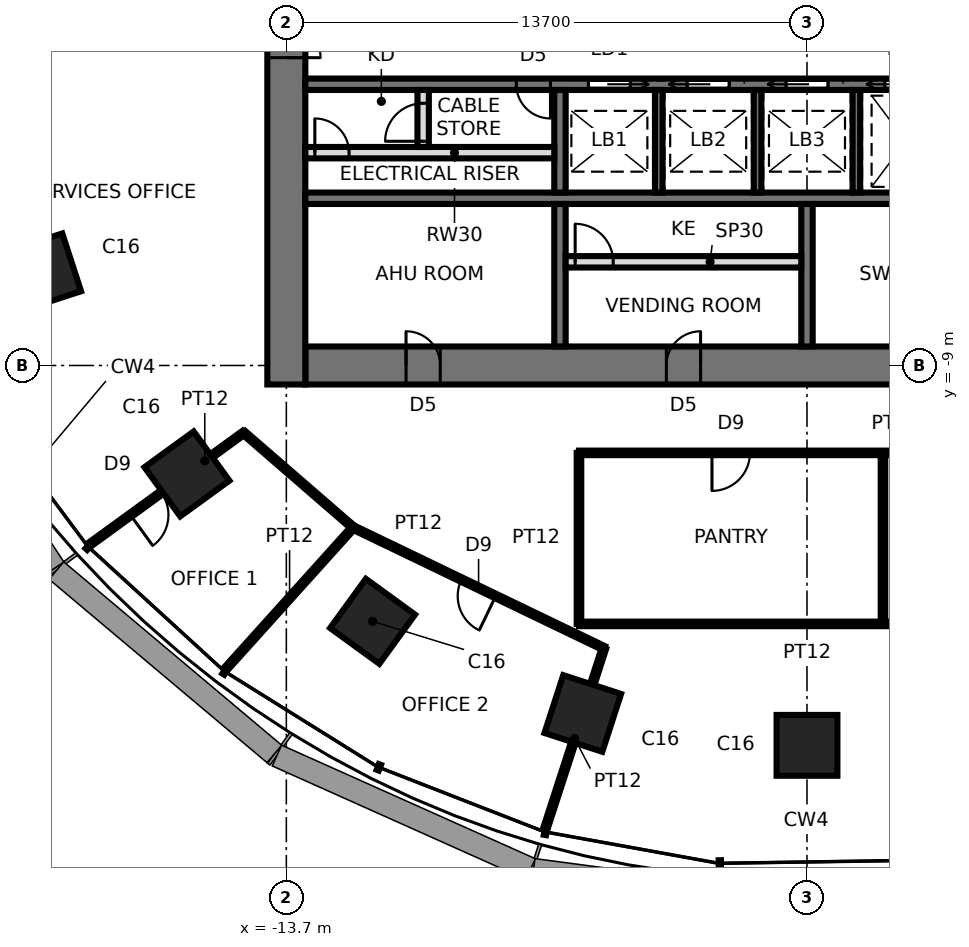
"""IFC4 building model, lengths in metres.
Left out: names, types, materials, properties, quantities, classifications, styles, units other than length and angle.
Written with IfcOpenShell. Run it as: python <this file> out.ifc"""

import sys

from ifc_helpers import new_model, si_unit, direction, frame, frame_2d, origin, origin_2d, place, context, subcontext, project, spatial, rectangle, extrude, element, fill, save


model = new_model("IFC4")
c1 = context("Model", 3, precision=1e-05, world=origin(), true_north=direction((0.0, 1.0)))
c2 = subcontext(c1, "Body", "Model", "MODEL_VIEW")
j1 = project(units=[si_unit("LENGTHUNIT", "METRE"), si_unit("PLANEANGLEUNIT", "RADIAN")], contexts=[c1])
p1 = place(None, origin())
s1 = spatial("IfcSite", under=j1, at=p1, CompositionType="ELEMENT")
p2 = place(p1, origin())
s2 = spatial("IfcBuilding", under=s1, at=p2, CompositionType="ELEMENT")
p3 = place(p2, frame((0.0, 0.0, 154.8)))
s3 = spatial("IfcBuildingStorey", under=s2, at=p3, CompositionType="ELEMENT", Elevation=154.8)
for number, where, z_axis, x_axis in (
    (1, (-20.109, -6.534, 0.0), (0.0, 0.0, 1.0), (-0.951, -0.309, 0.0)),
    (2, (-16.315, -11.854, 0.0), (0.0, 0.0, 1.0), (-0.809, -0.588, 0.0)),
    (3, (-11.43, -15.733, 0.0), (0.0, 0.0, 1.0), (-0.588, -0.809, 0.0)),
    (4, (-5.9, -18.157, 0.0), (0.0, 0.0, 1.0), (-0.309, -0.951, 0.0)),
    (5, (0.0, -18.996, 0.0), (0.0, 0.0, 1.0), (0.0, -1.0, 0.0)),
):
    element("IfcColumn", number, at=place(p3, frame(where, z_axis=z_axis, x_axis=x_axis)), inside=s3, PredefinedType="COLUMN", context=c2, shape_type="SweptSolid", body=[
        extrude(rectangle(XDim=1.6, YDim=1.6, at=origin_2d()), origin(), (0.0, 0.0, 1.0), 3.9),
    ])
p4 = place(p3, frame((-13.2, -9.0, 0.0), z_axis=(0.0, 0.0, 1.0), x_axis=(1.0, 0.0, 0.0)))
e6 = element("IfcWall", 6, at=p4, inside=s3, PredefinedType="SHEAR", context=c2, shape_type="SweptSolid", body=[
    extrude(rectangle(XDim=26.4, YDim=1.0, at=frame_2d((13.2, 0.0))), origin(), (0.0, 0.0, 1.0), 3.9),
])
p5 = place(p4, frame((2.65, 0.0, 0.0)))
e7 = element("IfcOpeningElement", 7, at=p5, cuts=e6, PredefinedType="OPENING", context=c2, shape_type="SweptSolid", body=[
    extrude(rectangle(XDim=0.9, YDim=2.1, at=frame_2d((0.45, 1.05))), frame((0.0, 0.51, 0.0), z_axis=(0.0, -1.0, 0.0), x_axis=(1.0, 0.0, 0.0)), (0.0, 0.0, 1.0), 1.02),
])
p6 = place(p4, frame((9.5, 0.0, 0.0)))
e8 = element("IfcOpeningElement", 8, at=p6, cuts=e6, PredefinedType="OPENING", context=c2, shape_type="SweptSolid", body=[
    extrude(rectangle(XDim=0.9, YDim=2.1, at=frame_2d((0.45, 1.05))), frame((0.0, 0.51, 0.0), z_axis=(0.0, -1.0, 0.0), x_axis=(1.0, 0.0, 0.0)), (0.0, 0.0, 1.0), 1.02),
])
p7 = place(p4, frame((16.0, 0.0, 0.0)))
e9 = element("IfcOpeningElement", 9, at=p7, cuts=e6, PredefinedType="OPENING", context=c2, shape_type="SweptSolid", body=[
    extrude(rectangle(XDim=0.9, YDim=2.1, at=frame_2d((0.45, 1.05))), frame((0.0, 0.51, 0.0), z_axis=(0.0, -1.0, 0.0), x_axis=(1.0, 0.0, 0.0)), (0.0, 0.0, 1.0), 1.02),
])
p8 = place(p4, frame((22.85, 0.0, 0.0)))
e10 = element("IfcOpeningElement", 10, at=p8, cuts=e6, PredefinedType="OPENING", context=c2, shape_type="SweptSolid", body=[
    extrude(rectangle(XDim=0.9, YDim=2.1, at=frame_2d((0.45, 1.05))), frame((0.0, 0.51, 0.0), z_axis=(0.0, -1.0, 0.0), x_axis=(1.0, 0.0, 0.0)), (0.0, 0.0, 1.0), 1.02),
])
p9 = place(p3, frame((-13.7, 9.5, 0.0), z_axis=(0.0, 0.0, 1.0), x_axis=(0.0, -1.0, 0.0)))
e11 = element("IfcWall", 11, at=p9, inside=s3, PredefinedType="SHEAR", context=c2, shape_type="SweptSolid", body=[
    extrude(rectangle(XDim=19.0, YDim=1.0, at=frame_2d((9.5, 0.0))), origin(), (0.0, 0.0, 1.0), 3.9),
])
p10 = place(p9, frame((8.6, 0.0, 0.0)))
e12 = element("IfcOpeningElement", 12, at=p10, cuts=e11, PredefinedType="OPENING", context=c2, shape_type="SweptSolid", body=[
    extrude(rectangle(XDim=1.8, YDim=2.4, at=frame_2d((0.9, 1.2))), frame((0.0, 0.51, 0.0), z_axis=(0.0, -1.0, 0.0), x_axis=(1.0, 0.0, 0.0)), (0.0, 0.0, 1.0), 1.02),
])
p11 = place(p3, frame((-13.2, -1.6, 0.0), z_axis=(0.0, 0.0, 1.0), x_axis=(1.0, 0.0, 0.0)))
e13 = element("IfcWall", 13, at=p11, inside=s3, PredefinedType="SHEAR", context=c2, shape_type="SweptSolid", body=[
    extrude(rectangle(XDim=26.4, YDim=0.3, at=frame_2d((13.2, 0.0))), origin(), (0.0, 0.0, 1.0), 3.9),
])
p12 = place(p11, frame((25.15, 0.0, 0.0)))
e14 = element("IfcOpeningElement", 14, at=p12, cuts=e13, PredefinedType="OPENING", context=c2, shape_type="SweptSolid", body=[
    extrude(rectangle(XDim=1.0, YDim=2.1, at=frame_2d((0.5, 1.05))), frame((0.0, 0.16, 0.0), z_axis=(0.0, -1.0, 0.0), x_axis=(1.0, 0.0, 0.0)), (0.0, 0.0, 1.0), 0.32),
])
p13 = place(p11, frame((7.45, 0.0, 0.0)))
e15 = element("IfcOpeningElement", 15, at=p13, cuts=e13, PredefinedType="OPENING", context=c2, shape_type="SweptSolid", body=[
    extrude(rectangle(XDim=1.1, YDim=2.3, at=frame_2d((0.55, 1.15))), frame((0.0, 0.16, 0.0), z_axis=(0.0, -1.0, 0.0), x_axis=(1.0, 0.0, 0.0)), (0.0, 0.0, 1.0), 0.32),
])
p14 = place(p11, frame((10.05, 0.0, 0.0)))
e16 = element("IfcOpeningElement", 16, at=p14, cuts=e13, PredefinedType="OPENING", context=c2, shape_type="SweptSolid", body=[
    extrude(rectangle(XDim=1.1, YDim=2.3, at=frame_2d((0.55, 1.15))), frame((0.0, 0.16, 0.0), z_axis=(0.0, -1.0, 0.0), x_axis=(1.0, 0.0, 0.0)), (0.0, 0.0, 1.0), 0.32),
])
p15 = place(p11, frame((12.65, 0.0, 0.0)))
e17 = element("IfcOpeningElement", 17, at=p15, cuts=e13, PredefinedType="OPENING", context=c2, shape_type="SweptSolid", body=[
    extrude(rectangle(XDim=1.1, YDim=2.3, at=frame_2d((0.55, 1.15))), frame((0.0, 0.16, 0.0), z_axis=(0.0, -1.0, 0.0), x_axis=(1.0, 0.0, 0.0)), (0.0, 0.0, 1.0), 0.32),
])
p16 = place(p11, frame((15.25, 0.0, 0.0)))
e18 = element("IfcOpeningElement", 18, at=p16, cuts=e13, PredefinedType="OPENING", context=c2, shape_type="SweptSolid", body=[
    extrude(rectangle(XDim=1.1, YDim=2.3, at=frame_2d((0.55, 1.15))), frame((0.0, 0.16, 0.0), z_axis=(0.0, -1.0, 0.0), x_axis=(1.0, 0.0, 0.0)), (0.0, 0.0, 1.0), 0.32),
])
p17 = place(p11, frame((17.85, 0.0, 0.0)))
e19 = element("IfcOpeningElement", 19, at=p17, cuts=e13, PredefinedType="OPENING", context=c2, shape_type="SweptSolid", body=[
    extrude(rectangle(XDim=1.1, YDim=2.3, at=frame_2d((0.55, 1.15))), frame((0.0, 0.16, 0.0), z_axis=(0.0, -1.0, 0.0), x_axis=(1.0, 0.0, 0.0)), (0.0, 0.0, 1.0), 0.32),
])
p18 = place(p11, frame((5.55, 0.0, 0.0)))
e20 = element("IfcOpeningElement", 20, at=p18, cuts=e13, PredefinedType="OPENING", context=c2, shape_type="SweptSolid", body=[
    extrude(rectangle(XDim=0.9, YDim=2.1, at=frame_2d((0.45, 1.05))), frame((0.0, 0.16, 0.0), z_axis=(0.0, -1.0, 0.0), x_axis=(1.0, 0.0, 0.0)), (0.0, 0.0, 1.0), 0.32),
])
p19 = place(p3, frame((-13.2, -4.6, 0.0), z_axis=(0.0, 0.0, 1.0), x_axis=(1.0, 0.0, 0.0)))
e21 = element("IfcWall", 21, at=p19, inside=s3, PredefinedType="SHEAR", context=c2, shape_type="SweptSolid", body=[
    extrude(rectangle(XDim=26.4, YDim=0.3, at=frame_2d((13.2, 0.0))), origin(), (0.0, 0.0, 1.0), 3.9),
])
p20 = place(p3, frame((-6.5, -1.75, 0.0), z_axis=(0.0, 0.0, 1.0), x_axis=(0.0, -1.0, 0.0)))
e22 = element("IfcWall", 22, at=p20, inside=s3, PredefinedType="SHEAR", context=c2, shape_type="SweptSolid", body=[
    extrude(rectangle(XDim=2.7, YDim=0.3, at=frame_2d((1.35, 0.0))), origin(), (0.0, 0.0, 1.0), 3.9),
])
p21 = place(p3, frame((-6.5, -4.75, 0.0), z_axis=(0.0, 0.0, 1.0), x_axis=(0.0, -1.0, 0.0)))
e23 = element("IfcWall", 23, at=p21, inside=s3, PredefinedType="SHEAR", context=c2, shape_type="SweptSolid", body=[
    extrude(rectangle(XDim=3.75, YDim=0.3, at=frame_2d((1.875, 0.0))), origin(), (0.0, 0.0, 1.0), 3.9),
])
for number, where, z_axis, x_axis in (
    (24, (-3.9, -1.75, 0.0), (0.0, 0.0, 1.0), (0.0, -1.0, 0.0)),
    (25, (-1.3, -1.75, 0.0), (0.0, 0.0, 1.0), (0.0, -1.0, 0.0)),
    (26, (1.3, -1.75, 0.0), (0.0, 0.0, 1.0), (0.0, -1.0, 0.0)),
):
    element("IfcWall", number, at=place(p3, frame(where, z_axis=z_axis, x_axis=x_axis)), inside=s3, PredefinedType="SHEAR", context=c2, shape_type="SweptSolid", body=[
        extrude(rectangle(XDim=2.7, YDim=0.2, at=frame_2d((1.35, 0.0))), origin(), (0.0, 0.0, 1.0), 3.9),
    ])
p22 = place(p3, frame((0.0, -4.75, 0.0), z_axis=(0.0, 0.0, 1.0), x_axis=(0.0, -1.0, 0.0)))
e27 = element("IfcWall", 27, at=p22, inside=s3, PredefinedType="SHEAR", context=c2, shape_type="SweptSolid", body=[
    extrude(rectangle(XDim=3.75, YDim=0.3, at=frame_2d((1.875, 0.0))), origin(), (0.0, 0.0, 1.0), 3.9),
])
p23 = place(p3, frame((-6.35, -6.272, 0.0), z_axis=(0.0, 0.0, 1.0), x_axis=(1.0, 0.0, 0.0)))
e28 = element("IfcWall", 28, at=p23, inside=s3, PredefinedType="PARTITIONING", context=c2, shape_type="SweptSolid", body=[
    extrude(rectangle(XDim=6.2, YDim=0.3, at=frame_2d((3.1, 0.0))), origin(), (0.0, 0.0, 1.0), 3.74),
])
p24 = place(p23, frame((0.25, 0.0, 0.0)))
e29 = element("IfcOpeningElement", 29, at=p24, cuts=e28, PredefinedType="OPENING", context=c2, shape_type="SweptSolid", body=[
    extrude(rectangle(XDim=1.0, YDim=2.4, at=frame_2d((0.5, 1.2))), frame((0.0, 0.16, 0.0), z_axis=(0.0, -1.0, 0.0), x_axis=(1.0, 0.0, 0.0)), (0.0, 0.0, 1.0), 0.32),
])
p25 = place(p3, frame((-13.2, -3.4, 0.0), z_axis=(0.0, 0.0, 1.0), x_axis=(1.0, 0.0, 0.0)))
e30 = element("IfcWall", 30, at=p25, inside=s3, PredefinedType="SOLIDWALL", context=c2, shape_type="SweptSolid", body=[
    extrude(rectangle(XDim=6.55, YDim=0.3, at=frame_2d((3.275, 0.0))), origin(), (0.0, 0.0, 1.0), 3.74),
])
p26 = place(p25, frame((0.25, 0.0, 0.0)))
e31 = element("IfcOpeningElement", 31, at=p26, cuts=e30, PredefinedType="OPENING", context=c2, shape_type="SweptSolid", body=[
    extrude(rectangle(XDim=0.9, YDim=2.1, at=frame_2d((0.45, 1.05))), frame((0.0, 0.16, 0.0), z_axis=(0.0, -1.0, 0.0), x_axis=(1.0, 0.0, 0.0)), (0.0, 0.0, 1.0), 0.32),
])
p27 = place(p3, frame((-10.1, -3.25, 0.0), z_axis=(0.0, 0.0, 1.0), x_axis=(0.0, 1.0, 0.0)))
e32 = element("IfcWall", 32, at=p27, inside=s3, PredefinedType="PARTITIONING", context=c2, shape_type="SweptSolid", body=[
    extrude(rectangle(XDim=1.5, YDim=0.3, at=frame_2d((0.75, 0.0))), origin(), (0.0, 0.0, 1.0), 3.74),
])
p28 = place(p27, frame((0.15, 0.0, 0.0)))
e33 = element("IfcOpeningElement", 33, at=p28, cuts=e32, PredefinedType="OPENING", context=c2, shape_type="SweptSolid", body=[
    extrude(rectangle(XDim=1.0, YDim=2.4, at=frame_2d((0.5, 1.2))), frame((0.0, 0.16, 0.0), z_axis=(0.0, -1.0, 0.0), x_axis=(1.0, 0.0, 0.0)), (0.0, 0.0, 1.0), 0.32),
])
p29 = place(p3, frame((-14.821, -10.768, 0.0), z_axis=(0.0, 0.0, 1.0), x_axis=(-0.809042143657, -0.587750635718, 0.0)))
e34 = element("IfcWall", 34, at=p29, inside=s3, PredefinedType="PARTITIONING", context=c2, shape_type="SweptSolid", body=[
    extrude(rectangle(XDim=5.0, YDim=0.12, at=frame_2d((2.5, 0.0))), origin(), (0.0, 0.0, 1.0), 2.94),
])
p30 = place(p29, frame((2.685, 0.0, 0.0)))
e35 = element("IfcOpeningElement", 35, at=p30, cuts=e34, PredefinedType="OPENING", context=c2, shape_type="SweptSolid", body=[
    extrude(rectangle(XDim=1.0, YDim=2.4, at=frame_2d((0.5, 1.2))), frame((0.0, 0.07, 0.0), z_axis=(0.0, -1.0, 0.0), x_axis=(1.0, 0.0, 0.0)), (0.0, 0.0, 1.0), 0.14),
])
p31 = place(p3, frame((-11.942, -13.263, 0.0), z_axis=(0.0, 0.0, 1.0), x_axis=(-0.755744060509, 0.654867097208, 0.0)))
e36 = element("IfcWall", 36, at=p31, inside=s3, PredefinedType="PARTITIONING", context=c2, shape_type="SweptSolid", body=[
    extrude(rectangle(XDim=3.809, YDim=0.12, at=frame_2d((1.905, 0.0))), origin(), (0.0, 0.0, 1.0), 3.74),
])
p32 = place(p3, frame((-11.942, -13.263, 0.0), z_axis=(0.0, 0.0, 1.0), x_axis=(-0.669126573551, -0.743148456614, 0.0)))
e37 = element("IfcWall", 37, at=p32, inside=s3, PredefinedType="PARTITIONING", context=c2, shape_type="SweptSolid", body=[
    extrude(rectangle(XDim=5.0, YDim=0.12, at=frame_2d((2.5, 0.0))), origin(), (0.0, 0.0, 1.0), 3.74),
])
p33 = place(p3, frame((-5.341, -16.439, 0.0), z_axis=(0.0, 0.0, 1.0), x_axis=(-0.901084159561, 0.43364425211, 0.0)))
e38 = element("IfcWall", 38, at=p33, inside=s3, PredefinedType="PARTITIONING", context=c2, shape_type="SweptSolid", body=[
    extrude(rectangle(XDim=7.325, YDim=0.12, at=frame_2d((3.663, 0.0))), origin(), (0.0, 0.0, 1.0), 3.74),
])
p34 = place(p33, frame((3.162, 0.0, 0.0)))
e39 = element("IfcOpeningElement", 39, at=p34, cuts=e38, PredefinedType="OPENING", context=c2, shape_type="SweptSolid", body=[
    extrude(rectangle(XDim=1.0, YDim=2.4, at=frame_2d((0.5, 1.2))), frame((0.0, 0.07, 0.0), z_axis=(0.0, -1.0, 0.0), x_axis=(1.0, 0.0, 0.0)), (0.0, 0.0, 1.0), 0.14),
])
p35 = place(p3, frame((-6.0, -15.8, 0.0), z_axis=(0.0, 0.0, 1.0), x_axis=(0.0, 1.0, 0.0)))
e40 = element("IfcWall", 40, at=p35, inside=s3, PredefinedType="PARTITIONING", context=c2, shape_type="SweptSolid", body=[
    extrude(rectangle(XDim=4.5, YDim=0.12, at=frame_2d((2.25, 0.0))), origin(), (0.0, 0.0, 1.0), 3.74),
])
p36 = place(p3, frame((-6.886, -21.194, 0.0), z_axis=(0.0, 0.0, 1.0), x_axis=(0.309040803421, 0.951048779938, 0.0)))
e41 = element("IfcWall", 41, at=p36, inside=s3, PredefinedType="PARTITIONING", context=c2, shape_type="SweptSolid", body=[
    extrude(rectangle(XDim=5.0, YDim=0.12, at=frame_2d((2.5, 0.0))), origin(), (0.0, 0.0, 1.0), 2.94),
])
p37 = place(p3, frame((-6.0, -11.3, 0.0), z_axis=(0.0, 0.0, 1.0), x_axis=(1.0, 0.0, 0.0)))
e42 = element("IfcWall", 42, at=p37, inside=s3, PredefinedType="PARTITIONING", context=c2, shape_type="SweptSolid", body=[
    extrude(rectangle(XDim=12.0, YDim=0.12, at=frame_2d((6.0, 0.0))), origin(), (0.0, 0.0, 1.0), 3.74),
])
p38 = place(p37, frame((3.5, 0.0, 0.0)))
e43 = element("IfcOpeningElement", 43, at=p38, cuts=e42, PredefinedType="OPENING", context=c2, shape_type="SweptSolid", body=[
    extrude(rectangle(XDim=1.0, YDim=2.4, at=frame_2d((0.5, 1.2))), frame((0.0, 0.07, 0.0), z_axis=(0.0, -1.0, 0.0), x_axis=(1.0, 0.0, 0.0)), (0.0, 0.0, 1.0), 0.14),
])
p39 = place(p3, frame((6.0, -15.8, 0.0), z_axis=(0.0, 0.0, 1.0), x_axis=(-1.0, 0.0, 0.0)))
e44 = element("IfcWall", 44, at=p39, inside=s3, PredefinedType="PARTITIONING", context=c2, shape_type="SweptSolid", body=[
    extrude(rectangle(XDim=12.0, YDim=0.12, at=frame_2d((6.0, 0.0))), origin(), (0.0, 0.0, 1.0), 3.286),
])
p40 = place(p3, frame((2.0, -11.3, 0.0), z_axis=(0.0, 0.0, 1.0), x_axis=(0.0, -1.0, 0.0)))
e45 = element("IfcWall", 45, at=p40, inside=s3, PredefinedType="PARTITIONING", context=c2, shape_type="SweptSolid", body=[
    extrude(rectangle(XDim=4.5, YDim=0.12, at=frame_2d((2.25, 0.0))), origin(), (0.0, 0.0, 1.0), 3.74),
])
p41 = place(p10, origin())
e46 = element("IfcDoor", 46, at=p41, inside=s3, OperationType="DOUBLE_DOOR_SINGLE_SWING", PredefinedType="DOOR", context=c2, shape_type="SweptSolid", body=[
    extrude(rectangle(XDim=1.72, YDim=2.36, at=frame_2d((0.9, 1.18))), frame((0.0, 0.025, 0.0), z_axis=(0.0, -1.0, 0.0), x_axis=(1.0, 0.0, 0.0)), (0.0, 0.0, 1.0), 0.05),
    extrude(rectangle(XDim=0.04, YDim=2.4, at=frame_2d((0.02, 1.2))), frame((0.0, 0.25, 0.0), z_axis=(0.0, -1.0, 0.0), x_axis=(1.0, 0.0, 0.0)), (0.0, 0.0, 1.0), 0.5),
    extrude(rectangle(XDim=0.04, YDim=2.4, at=frame_2d((1.78, 1.2))), frame((0.0, 0.25, 0.0), z_axis=(0.0, -1.0, 0.0), x_axis=(1.0, 0.0, 0.0)), (0.0, 0.0, 1.0), 0.5),
    extrude(rectangle(XDim=1.72, YDim=0.04, at=frame_2d((0.9, 2.38))), frame((0.0, 0.25, 0.0), z_axis=(0.0, -1.0, 0.0), x_axis=(1.0, 0.0, 0.0)), (0.0, 0.0, 1.0), 0.5),
])
fill(e12, e46)
p42 = place(p13, frame((1.1, 0.0, 0.0), z_axis=(0.0, 0.0, 1.0), x_axis=(-1.0, 0.0, 0.0)))
e47 = element("IfcDoor", 47, at=p42, inside=s3, OperationType="SLIDING_TO_LEFT", PredefinedType="DOOR", context=c2, shape_type="SweptSolid", body=[
    extrude(rectangle(XDim=1.1, YDim=2.3, at=frame_2d((0.55, 1.15))), frame((0.0, 0.025, 0.0), z_axis=(0.0, -1.0, 0.0), x_axis=(1.0, 0.0, 0.0)), (0.0, 0.0, 1.0), 0.05),
])
fill(e15, e47)
p43 = place(p14, frame((1.1, 0.0, 0.0), z_axis=(0.0, 0.0, 1.0), x_axis=(-1.0, 0.0, 0.0)))
e48 = element("IfcDoor", 48, at=p43, inside=s3, OperationType="SLIDING_TO_RIGHT", PredefinedType="DOOR", context=c2, shape_type="SweptSolid", body=[
    extrude(rectangle(XDim=1.1, YDim=2.3, at=frame_2d((0.55, 1.15))), frame((0.0, 0.025, 0.0), z_axis=(0.0, -1.0, 0.0), x_axis=(1.0, 0.0, 0.0)), (0.0, 0.0, 1.0), 0.05),
])
fill(e16, e48)
p44 = place(p15, frame((1.1, 0.0, 0.0), z_axis=(0.0, 0.0, 1.0), x_axis=(-1.0, 0.0, 0.0)))
e49 = element("IfcDoor", 49, at=p44, inside=s3, OperationType="SLIDING_TO_RIGHT", PredefinedType="DOOR", context=c2, shape_type="SweptSolid", body=[
    extrude(rectangle(XDim=1.1, YDim=2.3, at=frame_2d((0.55, 1.15))), frame((0.0, 0.025, 0.0), z_axis=(0.0, -1.0, 0.0), x_axis=(1.0, 0.0, 0.0)), (0.0, 0.0, 1.0), 0.05),
])
fill(e17, e49)
p45 = place(p16, frame((1.1, 0.0, 0.0), z_axis=(0.0, 0.0, 1.0), x_axis=(-1.0, 0.0, 0.0)))
e50 = element("IfcDoor", 50, at=p45, inside=s3, OperationType="SLIDING_TO_RIGHT", PredefinedType="DOOR", context=c2, shape_type="SweptSolid", body=[
    extrude(rectangle(XDim=1.1, YDim=2.3, at=frame_2d((0.55, 1.15))), frame((0.0, 0.025, 0.0), z_axis=(0.0, -1.0, 0.0), x_axis=(1.0, 0.0, 0.0)), (0.0, 0.0, 1.0), 0.05),
])
fill(e18, e50)
p46 = place(p18, frame((0.9, 0.0, 0.0), z_axis=(0.0, 0.0, 1.0), x_axis=(-1.0, 0.0, 0.0)))
e51 = element("IfcDoor", 51, at=p46, inside=s3, OperationType="SINGLE_SWING_LEFT", PredefinedType="DOOR", context=c2, shape_type="SweptSolid", body=[
    extrude(rectangle(XDim=0.9, YDim=2.1, at=frame_2d((0.45, 1.05))), frame((0.0, 0.025, 0.0), z_axis=(0.0, -1.0, 0.0), x_axis=(1.0, 0.0, 0.0)), (0.0, 0.0, 1.0), 0.05),
])
fill(e20, e51)
p47 = place(p5, origin())
e52 = element("IfcDoor", 52, at=p47, inside=s3, OperationType="SINGLE_SWING_LEFT", PredefinedType="DOOR", context=c2, shape_type="SweptSolid", body=[
    extrude(rectangle(XDim=0.82, YDim=2.06, at=frame_2d((0.45, 1.03))), frame((0.0, 0.025, 0.0), z_axis=(0.0, -1.0, 0.0), x_axis=(1.0, 0.0, 0.0)), (0.0, 0.0, 1.0), 0.05),
    extrude(rectangle(XDim=0.04, YDim=2.1, at=frame_2d((0.02, 1.05))), frame((0.0, 0.25, 0.0), z_axis=(0.0, -1.0, 0.0), x_axis=(1.0, 0.0, 0.0)), (0.0, 0.0, 1.0), 0.5),
    extrude(rectangle(XDim=0.04, YDim=2.1, at=frame_2d((0.88, 1.05))), frame((0.0, 0.25, 0.0), z_axis=(0.0, -1.0, 0.0), x_axis=(1.0, 0.0, 0.0)), (0.0, 0.0, 1.0), 0.5),
    extrude(rectangle(XDim=0.82, YDim=0.04, at=frame_2d((0.45, 2.08))), frame((0.0, 0.25, 0.0), z_axis=(0.0, -1.0, 0.0), x_axis=(1.0, 0.0, 0.0)), (0.0, 0.0, 1.0), 0.5),
])
fill(e7, e52)
p48 = place(p6, origin())
e53 = element("IfcDoor", 53, at=p48, inside=s3, OperationType="SINGLE_SWING_RIGHT", PredefinedType="DOOR", context=c2, shape_type="SweptSolid", body=[
    extrude(rectangle(XDim=0.82, YDim=2.06, at=frame_2d((0.45, 1.03))), frame((0.0, 0.025, 0.0), z_axis=(0.0, -1.0, 0.0), x_axis=(1.0, 0.0, 0.0)), (0.0, 0.0, 1.0), 0.05),
    extrude(rectangle(XDim=0.04, YDim=2.1, at=frame_2d((0.02, 1.05))), frame((0.0, 0.25, 0.0), z_axis=(0.0, -1.0, 0.0), x_axis=(1.0, 0.0, 0.0)), (0.0, 0.0, 1.0), 0.5),
    extrude(rectangle(XDim=0.04, YDim=2.1, at=frame_2d((0.88, 1.05))), frame((0.0, 0.25, 0.0), z_axis=(0.0, -1.0, 0.0), x_axis=(1.0, 0.0, 0.0)), (0.0, 0.0, 1.0), 0.5),
    extrude(rectangle(XDim=0.82, YDim=0.04, at=frame_2d((0.45, 2.08))), frame((0.0, 0.25, 0.0), z_axis=(0.0, -1.0, 0.0), x_axis=(1.0, 0.0, 0.0)), (0.0, 0.0, 1.0), 0.5),
])
fill(e8, e53)
p49 = place(p24, origin())
e54 = element("IfcDoor", 54, at=p49, inside=s3, OperationType="SINGLE_SWING_LEFT", PredefinedType="DOOR", context=c2, shape_type="SweptSolid", body=[
    extrude(rectangle(XDim=1.0, YDim=2.4, at=frame_2d((0.5, 1.2))), frame((0.0, 0.025, 0.0), z_axis=(0.0, -1.0, 0.0), x_axis=(1.0, 0.0, 0.0)), (0.0, 0.0, 1.0), 0.05),
])
fill(e29, e54)
p50 = place(p26, origin())
e55 = element("IfcDoor", 55, at=p50, inside=s3, OperationType="SINGLE_SWING_LEFT", PredefinedType="DOOR", context=c2, shape_type="SweptSolid", body=[
    extrude(rectangle(XDim=0.9, YDim=2.1, at=frame_2d((0.45, 1.05))), frame((0.0, 0.025, 0.0), z_axis=(0.0, -1.0, 0.0), x_axis=(1.0, 0.0, 0.0)), (0.0, 0.0, 1.0), 0.05),
])
fill(e31, e55)
p51 = place(p28, origin())
e56 = element("IfcDoor", 56, at=p51, inside=s3, OperationType="SINGLE_SWING_LEFT", PredefinedType="DOOR", context=c2, shape_type="SweptSolid", body=[
    extrude(rectangle(XDim=1.0, YDim=2.4, at=frame_2d((0.5, 1.2))), frame((0.0, 0.025, 0.0), z_axis=(0.0, -1.0, 0.0), x_axis=(1.0, 0.0, 0.0)), (0.0, 0.0, 1.0), 0.05),
])
fill(e33, e56)
p52 = place(p30, origin())
e57 = element("IfcDoor", 57, at=p52, inside=s3, OperationType="SINGLE_SWING_RIGHT", PredefinedType="DOOR", context=c2, shape_type="SweptSolid", body=[
    extrude(rectangle(XDim=1.0, YDim=2.4, at=frame_2d((0.5, 1.2))), frame((0.0, 0.025, 0.0), z_axis=(0.0, -1.0, 0.0), x_axis=(1.0, 0.0, 0.0)), (0.0, 0.0, 1.0), 0.05),
])
fill(e35, e57)
p53 = place(p34, origin())
e58 = element("IfcDoor", 58, at=p53, inside=s3, OperationType="SINGLE_SWING_LEFT", PredefinedType="DOOR", context=c2, shape_type="SweptSolid", body=[
    extrude(rectangle(XDim=1.0, YDim=2.4, at=frame_2d((0.5, 1.2))), frame((0.0, 0.025, 0.0), z_axis=(0.0, -1.0, 0.0), x_axis=(1.0, 0.0, 0.0)), (0.0, 0.0, 1.0), 0.05),
])
fill(e39, e58)
p54 = place(p38, frame((1.0, 0.0, 0.0), z_axis=(0.0, 0.0, 1.0), x_axis=(-1.0, 0.0, 0.0)))
e59 = element("IfcDoor", 59, at=p54, inside=s3, OperationType="SINGLE_SWING_RIGHT", PredefinedType="DOOR", context=c2, shape_type="SweptSolid", body=[
    extrude(rectangle(XDim=1.0, YDim=2.4, at=frame_2d((0.5, 1.2))), frame((0.0, 0.025, 0.0), z_axis=(0.0, -1.0, 0.0), x_axis=(1.0, 0.0, 0.0)), (0.0, 0.0, 1.0), 0.05),
])
fill(e43, e59)
save(model, sys.argv[1])
